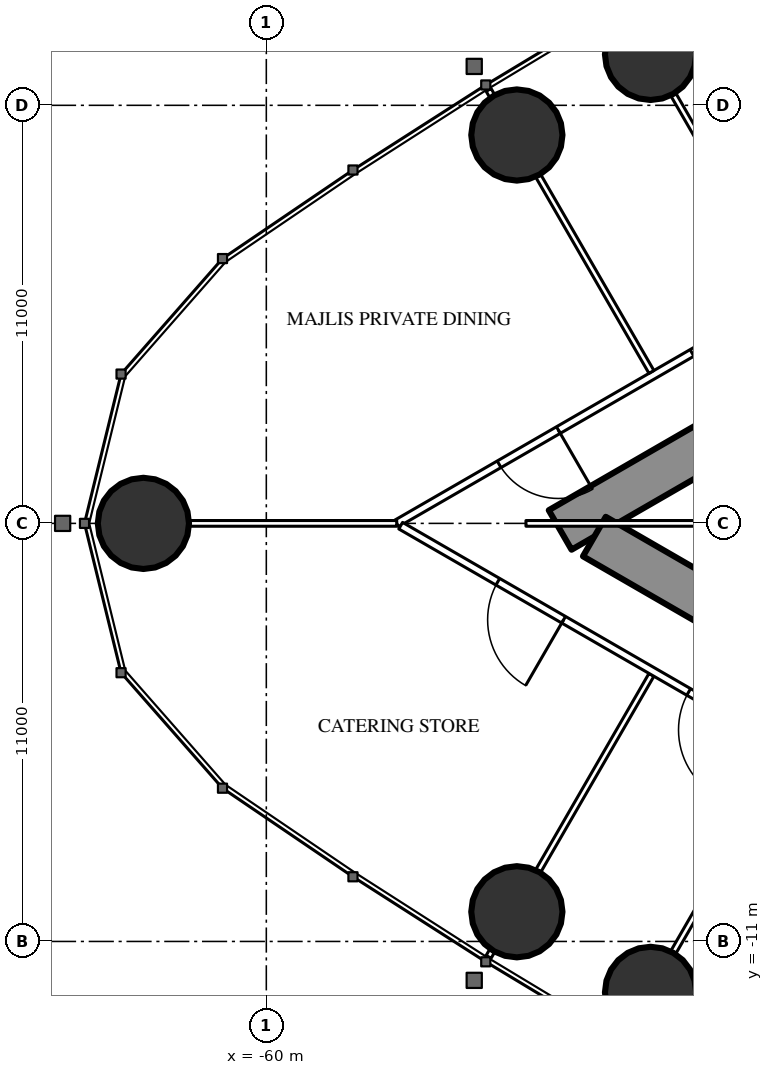
"""IFC4 building model, lengths in metres.
Left out: names, types, materials, properties, quantities, classifications, styles, units other than length and angle.
Written with IfcOpenShell. Run it as: python <this file> out.ifc"""

import sys

from ifc_helpers import new_model, si_unit, direction, frame, frame_2d, origin, origin_2d, place, context, subcontext, project, spatial, rectangle, circle, extrude, element, fill, save


model = new_model("IFC4")
c1 = context("Model", 3, precision=1e-05, world=origin(), true_north=direction((0.0, 1.0)))
c2 = subcontext(c1, "Body", "Model", "MODEL_VIEW")
j1 = project(units=[si_unit("LENGTHUNIT", "METRE"), si_unit("PLANEANGLEUNIT", "RADIAN")], contexts=[c1])
p1 = place(None, origin())
s1 = spatial("IfcSite", under=j1, at=p1, CompositionType="ELEMENT")
p2 = place(p1, origin())
s2 = spatial("IfcBuilding", under=s1, at=p2, CompositionType="ELEMENT")
p3 = place(p2, frame((0.0, 0.0, 251.9)))
s3 = spatial("IfcBuildingStorey", under=s2, at=p3, CompositionType="ELEMENT", Elevation=251.9)
for number, where, z_axis, x_axis in (
    (1, (-63.234, 0.0, 0.0), (0.0, 0.0, 1.0), (1.0, 0.0, 0.0)),
    (2, (-53.408, -10.219, 0.0), (0.0, 0.0, 1.0), (1.0, 0.0, 0.0)),
    (3, (-49.89, -12.34, 0.0), (0.0, 0.0, 1.0), (1.0, 0.0, 0.0)),
    (4, (-49.89, 12.34, 0.0), (0.0, 0.0, 1.0), (1.0, 0.0, 0.0)),
    (5, (-53.408, 10.219, 0.0), (0.0, 0.0, 1.0), (1.0, 0.0, 0.0)),
):
    element("IfcColumn", number, at=place(p3, frame(where, z_axis=z_axis, x_axis=x_axis)), inside=s3, PredefinedType="COLUMN", context=c2, shape_type="SweptSolid", body=[
        extrude(circle(Radius=1.2, at=origin_2d()), origin(), (0.0, 0.0, 1.0), 5.4),
    ])
p4 = place(p3, frame((-27.2, 14.3, 0.0), z_axis=(0.0, 0.0, 1.0), x_axis=(-0.866026593062, -0.499997940104, 0.0)))
e6 = element("IfcWall", 6, at=p4, inside=s3, PredefinedType="SHEAR", context=c2, shape_type="SweptSolid", body=[
    extrude(rectangle(XDim=28.946, YDim=1.2, at=frame_2d((14.473, 0.0))), origin(), (0.0, 0.0, 1.0), 5.4),
])
p5 = place(p4, frame((4.6, 0.0, 0.0)))
e7 = element("IfcOpeningElement", 7, at=p5, cuts=e6, PredefinedType="OPENING", context=c2, shape_type="SweptSolid", body=[
    extrude(rectangle(XDim=1.0, YDim=2.2, at=frame_2d((0.5, 1.1))), frame((0.0, 0.61, 0.0), z_axis=(0.0, -1.0, 0.0), x_axis=(1.0, 0.0, 0.0)), (0.0, 0.0, 1.0), 1.22),
])
p6 = place(p4, frame((13.395, 0.0, 0.0)))
e8 = element("IfcOpeningElement", 8, at=p6, cuts=e6, PredefinedType="OPENING", context=c2, shape_type="SweptSolid", body=[
    extrude(rectangle(XDim=1.8, YDim=2.2, at=frame_2d((0.9, 1.1))), frame((0.0, 0.61, 0.0), z_axis=(0.0, -1.0, 0.0), x_axis=(1.0, 0.0, 0.0)), (0.0, 0.0, 1.0), 1.22),
])
p7 = place(p3, frame((-27.2, -14.3, 0.0), z_axis=(0.0, 0.0, 1.0), x_axis=(-0.866024021859, 0.500002393557, 0.0)))
e9 = element("IfcWall", 9, at=p7, inside=s3, PredefinedType="SHEAR", context=c2, shape_type="SweptSolid", body=[
    extrude(rectangle(XDim=27.907, YDim=1.2, at=frame_2d((13.954, 0.0))), origin(), (0.0, 0.0, 1.0), 5.4),
])
p8 = place(p7, frame((4.6, 0.0, 0.0)))
e10 = element("IfcOpeningElement", 10, at=p8, cuts=e9, PredefinedType="OPENING", context=c2, shape_type="SweptSolid", body=[
    extrude(rectangle(XDim=1.0, YDim=2.2, at=frame_2d((0.5, 1.1))), frame((0.0, 0.61, 0.0), z_axis=(0.0, -1.0, 0.0), x_axis=(1.0, 0.0, 0.0)), (0.0, 0.0, 1.0), 1.22),
])
p9 = place(p7, frame((13.395, 0.0, 0.0)))
e11 = element("IfcOpeningElement", 11, at=p9, cuts=e9, PredefinedType="OPENING", context=c2, shape_type="SweptSolid", body=[
    extrude(rectangle(XDim=1.8, YDim=2.2, at=frame_2d((0.9, 1.1))), frame((0.0, 0.61, 0.0), z_axis=(0.0, -1.0, 0.0), x_axis=(1.0, 0.0, 0.0)), (0.0, 0.0, 1.0), 1.22),
])
p10 = place(p3, frame((-28.681, 16.101, 0.0), z_axis=(0.0, 0.0, 1.0), x_axis=(-0.866024860443, -0.500000941094, 0.0)))
e12 = element("IfcWall", 12, at=p10, inside=s3, PredefinedType="PARTITIONING", context=c2, shape_type="SweptSolid", body=[
    extrude(rectangle(XDim=32.201, YDim=0.2, at=frame_2d((16.101, 0.0))), origin(), (0.0, 0.0, 1.0), 5.15),
])
p11 = place(p10, frame((7.266, 0.0, 0.0)))
e13 = element("IfcOpeningElement", 13, at=p11, cuts=e12, PredefinedType="OPENING", context=c2, shape_type="SweptSolid", body=[
    extrude(rectangle(XDim=1.8, YDim=2.2, at=frame_2d((0.9, 1.1))), frame((0.0, 0.11, 0.0), z_axis=(0.0, -1.0, 0.0), x_axis=(1.0, 0.0, 0.0)), (0.0, 0.0, 1.0), 0.22),
])
p12 = place(p10, frame((17.182, 0.0, 0.0)))
e14 = element("IfcOpeningElement", 14, at=p12, cuts=e12, PredefinedType="OPENING", context=c2, shape_type="SweptSolid", body=[
    extrude(rectangle(XDim=2.0, YDim=2.4, at=frame_2d((1.0, 1.2))), frame((0.0, 0.11, 0.0), z_axis=(0.0, -1.0, 0.0), x_axis=(1.0, 0.0, 0.0)), (0.0, 0.0, 1.0), 0.22),
])
p13 = place(p10, frame((21.43, 0.0, 0.0)))
e15 = element("IfcOpeningElement", 15, at=p13, cuts=e12, PredefinedType="OPENING", context=c2, shape_type="SweptSolid", body=[
    extrude(rectangle(XDim=1.8, YDim=2.2, at=frame_2d((0.9, 1.1))), frame((0.0, 0.11, 0.0), z_axis=(0.0, -1.0, 0.0), x_axis=(1.0, 0.0, 0.0)), (0.0, 0.0, 1.0), 0.22),
])
p14 = place(p10, frame((27.29, 0.0, 0.0)))
e16 = element("IfcOpeningElement", 16, at=p14, cuts=e12, PredefinedType="OPENING", context=c2, shape_type="SweptSolid", body=[
    extrude(rectangle(XDim=1.8, YDim=2.2, at=frame_2d((0.9, 1.1))), frame((0.0, 0.11, 0.0), z_axis=(0.0, -1.0, 0.0), x_axis=(1.0, 0.0, 0.0)), (0.0, 0.0, 1.0), 0.22),
])
p15 = place(p3, frame((-46.274, 6.059, 0.0), z_axis=(0.0, 0.0, 1.0), x_axis=(-0.500020471368, 0.866013584312, 0.0)))
e17 = element("IfcWall", 17, at=p15, inside=s3, PredefinedType="PARTITIONING", context=c2, shape_type="SweptSolid", body=[
    extrude(rectangle(XDim=6.028, YDim=0.15, at=frame_2d((3.014, 0.0))), origin(), (0.0, 0.0, 1.0), 4.25),
])
p16 = place(p3, frame((-49.866, 3.985, 0.0), z_axis=(0.0, 0.0, 1.0), x_axis=(-0.500000694566, 0.866025002776, 0.0)))
e18 = element("IfcWall", 18, at=p16, inside=s3, PredefinedType="PARTITIONING", context=c2, shape_type="SweptSolid", body=[
    extrude(rectangle(XDim=5.95, YDim=0.15, at=frame_2d((2.975, 0.0))), origin(), (0.0, 0.0, 1.0), 4.25),
])
p17 = place(p3, frame((-54.061, 11.25, 0.0), z_axis=(0.0, 0.0, 1.0), x_axis=(-0.500391173478, 0.865799441849, 0.0)))
e19 = element("IfcWall", 19, at=p17, inside=s3, PredefinedType="PARTITIONING", context=c2, shape_type="SweptSolid", body=[
    extrude(rectangle(XDim=0.179, YDim=0.15, at=frame_2d((0.089, 0.0))), origin(), (0.0, 0.0, 1.0), 4.25),
])
p18 = place(p3, frame((-46.274, -6.059, 0.0), z_axis=(0.0, 0.0, 1.0), x_axis=(-0.500020471368, -0.866013584312, 0.0)))
e20 = element("IfcWall", 20, at=p18, inside=s3, PredefinedType="PARTITIONING", context=c2, shape_type="SweptSolid", body=[
    extrude(rectangle(XDim=6.028, YDim=0.15, at=frame_2d((3.014, 0.0))), origin(), (0.0, 0.0, 1.0), 4.25),
])
p19 = place(p3, frame((-49.866, -3.985, 0.0), z_axis=(0.0, 0.0, 1.0), x_axis=(-0.500000694566, -0.866025002776, 0.0)))
e21 = element("IfcWall", 21, at=p19, inside=s3, PredefinedType="PARTITIONING", context=c2, shape_type="SweptSolid", body=[
    extrude(rectangle(XDim=5.95, YDim=0.15, at=frame_2d((2.975, 0.0))), origin(), (0.0, 0.0, 1.0), 4.25),
])
p20 = place(p3, frame((-54.061, -11.25, 0.0), z_axis=(0.0, 0.0, 1.0), x_axis=(-0.500391173478, -0.865799441849, 0.0)))
e22 = element("IfcWall", 22, at=p20, inside=s3, PredefinedType="PARTITIONING", context=c2, shape_type="SweptSolid", body=[
    extrude(rectangle(XDim=0.179, YDim=0.15, at=frame_2d((0.089, 0.0))), origin(), (0.0, 0.0, 1.0), 4.25),
])
p21 = place(p3, frame((-56.568, 0.0, 0.0), z_axis=(0.0, 0.0, 1.0), x_axis=(-1.0, 0.0, 0.0)))
e23 = element("IfcWall", 23, at=p21, inside=s3, PredefinedType="PARTITIONING", context=c2, shape_type="SweptSolid", body=[
    extrude(rectangle(XDim=5.446, YDim=0.15, at=frame_2d((2.723, 0.0))), origin(), (0.0, 0.0, 1.0), 4.25),
])
p22 = place(p3, frame((-44.715, -6.844, 0.0), z_axis=(0.0, 0.0, 1.0), x_axis=(-0.866025261224, 0.500000246922, 0.0)))
e24 = element("IfcWall", 24, at=p22, inside=s3, PredefinedType="PARTITIONING", context=c2, shape_type="SweptSolid", body=[
    extrude(rectangle(XDim=13.567, YDim=0.2, at=frame_2d((6.783, 0.0))), origin(), (0.0, 0.0, 1.0), 5.15),
])
p23 = place(p22, frame((8.616, 0.0, 0.0)))
e25 = element("IfcOpeningElement", 25, at=p23, cuts=e24, PredefinedType="OPENING", context=c2, shape_type="SweptSolid", body=[
    extrude(rectangle(XDim=2.0, YDim=2.4, at=frame_2d((1.0, 1.2))), frame((0.0, 0.11, 0.0), z_axis=(0.0, -1.0, 0.0), x_axis=(1.0, 0.0, 0.0)), (0.0, 0.0, 1.0), 0.22),
])
p24 = place(p22, frame((2.816, 0.0, 0.0)))
e26 = element("IfcOpeningElement", 26, at=p24, cuts=e24, PredefinedType="OPENING", context=c2, shape_type="SweptSolid", body=[
    extrude(rectangle(XDim=2.0, YDim=2.4, at=frame_2d((1.0, 1.2))), frame((0.0, 0.11, 0.0), z_axis=(0.0, -1.0, 0.0), x_axis=(1.0, 0.0, 0.0)), (0.0, 0.0, 1.0), 0.22),
])
p25 = place(p22, frame((0.5, 0.0, 0.0)))
e27 = element("IfcOpeningElement", 27, at=p25, cuts=e24, PredefinedType="OPENING", context=c2, shape_type="SweptSolid", body=[
    extrude(rectangle(XDim=0.967, YDim=2.2, at=frame_2d((0.483, 1.1))), frame((0.0, 0.11, 0.0), z_axis=(0.0, -1.0, 0.0), x_axis=(1.0, 0.0, 0.0)), (0.0, 0.0, 1.0), 0.22),
])
p26 = place(p3, frame((-44.575, 0.0, 0.0), z_axis=(0.0, 0.0, 1.0), x_axis=(-1.0, 0.0, 0.0)))
e28 = element("IfcWall", 28, at=p26, inside=s3, PredefinedType="PARTITIONING", context=c2, shape_type="SweptSolid", body=[
    extrude(rectangle(XDim=8.593, YDim=0.15, at=frame_2d((4.297, 0.0))), origin(), (0.0, 0.0, 1.0), 4.25),
])
p27 = place(p13, origin())
e29 = element("IfcDoor", 29, at=p27, inside=s3, OperationType="DOUBLE_DOOR_SINGLE_SWING", PredefinedType="DOOR", context=c2, shape_type="SweptSolid", body=[
    extrude(rectangle(XDim=1.8, YDim=2.2, at=frame_2d((0.9, 1.1))), frame((0.0, 0.025, 0.0), z_axis=(0.0, -1.0, 0.0), x_axis=(1.0, 0.0, 0.0)), (0.0, 0.0, 1.0), 0.05),
])
fill(e15, e29)
p28 = place(p14, origin())
e30 = element("IfcDoor", 30, at=p28, inside=s3, OperationType="DOUBLE_DOOR_SINGLE_SWING", PredefinedType="DOOR", context=c2, shape_type="SweptSolid", body=[
    extrude(rectangle(XDim=1.8, YDim=2.2, at=frame_2d((0.9, 1.1))), frame((0.0, 0.025, 0.0), z_axis=(0.0, -1.0, 0.0), x_axis=(1.0, 0.0, 0.0)), (0.0, 0.0, 1.0), 0.05),
])
fill(e16, e30)
p29 = place(p23, origin())
e31 = element("IfcDoor", 31, at=p29, inside=s3, OperationType="DOUBLE_DOOR_SINGLE_SWING", PredefinedType="DOOR", context=c2, shape_type="SweptSolid", body=[
    extrude(rectangle(XDim=2.0, YDim=2.4, at=frame_2d((1.0, 1.2))), frame((0.0, 0.025, 0.0), z_axis=(0.0, -1.0, 0.0), x_axis=(1.0, 0.0, 0.0)), (0.0, 0.0, 1.0), 0.05),
])
fill(e25, e31)
p30 = place(p24, origin())
e32 = element("IfcDoor", 32, at=p30, inside=s3, OperationType="DOUBLE_DOOR_SINGLE_SWING", PredefinedType="DOOR", context=c2, shape_type="SweptSolid", body=[
    extrude(rectangle(XDim=2.0, YDim=2.4, at=frame_2d((1.0, 1.2))), frame((0.0, 0.025, 0.0), z_axis=(0.0, -1.0, 0.0), x_axis=(1.0, 0.0, 0.0)), (0.0, 0.0, 1.0), 0.05),
])
fill(e26, e32)
save(model, sys.argv[1])
